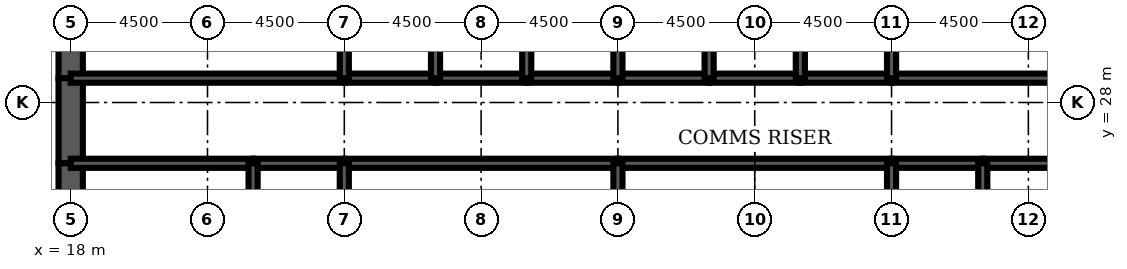
"""IFC4 building model, lengths in metres.
Left out: names, types, materials, properties, quantities, classifications, styles, units other than length and angle.
Written with IfcOpenShell. Run it as: python <this file> out.ifc"""

import sys

from ifc_helpers import new_model, si_unit, direction, frame, frame_2d, origin, place, context, subcontext, project, spatial, rectangle, extrude, element, fill, save


model = new_model("IFC4")
c1 = context("Model", 3, precision=1e-05, world=origin(), true_north=direction((0.0, 1.0)))
c2 = subcontext(c1, "Body", "Model", "MODEL_VIEW")
j1 = project(units=[si_unit("LENGTHUNIT", "METRE"), si_unit("PLANEANGLEUNIT", "RADIAN")], contexts=[c1])
p1 = place(None, origin())
s1 = spatial("IfcSite", under=j1, at=p1, CompositionType="ELEMENT")
p2 = place(p1, origin())
s2 = spatial("IfcBuilding", under=s1, at=p2, CompositionType="ELEMENT")
p3 = place(p2, frame((0.0, 0.0, 202.6)))
s3 = spatial("IfcBuildingStorey", under=s2, at=p3, CompositionType="ELEMENT", Elevation=202.6)
p4 = place(p3, frame((18.0, 32.0, 0.0), z_axis=(0.0, 0.0, 1.0), x_axis=(0.0, -1.0, 0.0)))
e1 = element("IfcWall", 1, at=p4, inside=s3, PredefinedType="SHEAR", context=c2, shape_type="SweptSolid", body=[
    extrude(rectangle(XDim=3.2, YDim=0.8, at=frame_2d((1.6, 0.0))), origin(), (0.0, 0.0, 1.0), 4.2),
])
p5 = place(p3, frame((18.0, 28.8, 0.0), z_axis=(0.0, 0.0, 1.0), x_axis=(0.0, -1.0, 0.0)))
e2 = element("IfcWall", 2, at=p5, inside=s3, PredefinedType="SHEAR", context=c2, shape_type="SweptSolid", body=[
    extrude(rectangle(XDim=2.8, YDim=0.8, at=frame_2d((1.4, 0.0))), origin(), (0.0, 0.0, 1.0), 4.2),
])
p6 = place(p5, frame((0.4, 0.0, 0.0)))
e3 = element("IfcOpeningElement", 3, at=p6, cuts=e2, PredefinedType="OPENING", context=c2, shape_type="SweptSolid", body=[
    extrude(rectangle(XDim=1.8, YDim=2.1, at=frame_2d((0.9, 1.05))), frame((0.0, 0.41, 0.0), z_axis=(0.0, -1.0, 0.0), x_axis=(1.0, 0.0, 0.0)), (0.0, 0.0, 1.0), 0.82),
])
p7 = place(p3, frame((18.0, 26.0, 0.0), z_axis=(0.0, 0.0, 1.0), x_axis=(0.0, -1.0, 0.0)))
e4 = element("IfcWall", 4, at=p7, inside=s3, PredefinedType="SHEAR", context=c2, shape_type="SweptSolid", body=[
    extrude(rectangle(XDim=4.0, YDim=0.8, at=frame_2d((2.0, 0.0))), origin(), (0.0, 0.0, 1.0), 4.2),
])
p8 = place(p3, frame((18.0, 28.8, 0.0), z_axis=(0.0, 0.0, 1.0), x_axis=(1.0, 0.0, 0.0)))
e5 = element("IfcWall", 5, at=p8, inside=s3, PredefinedType="SOLIDWALL", context=c2, shape_type="SweptSolid", body=[
    extrude(rectangle(XDim=9.0, YDim=0.3, at=frame_2d((4.5, 0.0))), origin(), (0.0, 0.0, 1.0), 4.2),
])
p9 = place(p8, frame((0.65, 0.0, 0.0)))
e6 = element("IfcOpeningElement", 6, at=p9, cuts=e5, PredefinedType="OPENING", context=c2, shape_type="SweptSolid", body=[
    extrude(rectangle(XDim=1.0, YDim=2.1, at=frame_2d((0.5, 1.05))), frame((0.0, 0.16, 0.0), z_axis=(0.0, -1.0, 0.0), x_axis=(1.0, 0.0, 0.0)), (0.0, 0.0, 1.0), 0.32),
])
p10 = place(p3, frame((27.0, 28.8, 0.0), z_axis=(0.0, 0.0, 1.0), x_axis=(1.0, 0.0, 0.0)))
e7 = element("IfcWall", 7, at=p10, inside=s3, PredefinedType="SOLIDWALL", context=c2, shape_type="SweptSolid", body=[
    extrude(rectangle(XDim=3.0, YDim=0.3, at=frame_2d((1.5, 0.0))), origin(), (0.0, 0.0, 1.0), 4.2),
])
p11 = place(p10, frame((0.95, 0.0, 0.0)))
e8 = element("IfcOpeningElement", 8, at=p11, cuts=e7, PredefinedType="OPENING", context=c2, shape_type="SweptSolid", body=[
    extrude(rectangle(XDim=1.1, YDim=2.2, at=frame_2d((0.55, 1.1))), frame((0.0, 0.16, 0.0), z_axis=(0.0, -1.0, 0.0), x_axis=(1.0, 0.0, 0.0)), (0.0, 0.0, 1.0), 0.32),
])
p12 = place(p3, frame((30.0, 28.8, 0.0), z_axis=(0.0, 0.0, 1.0), x_axis=(1.0, 0.0, 0.0)))
e9 = element("IfcWall", 9, at=p12, inside=s3, PredefinedType="SOLIDWALL", context=c2, shape_type="SweptSolid", body=[
    extrude(rectangle(XDim=3.0, YDim=0.3, at=frame_2d((1.5, 0.0))), origin(), (0.0, 0.0, 1.0), 4.2),
])
p13 = place(p12, frame((0.95, 0.0, 0.0)))
e10 = element("IfcOpeningElement", 10, at=p13, cuts=e9, PredefinedType="OPENING", context=c2, shape_type="SweptSolid", body=[
    extrude(rectangle(XDim=1.1, YDim=2.2, at=frame_2d((0.55, 1.1))), frame((0.0, 0.16, 0.0), z_axis=(0.0, -1.0, 0.0), x_axis=(1.0, 0.0, 0.0)), (0.0, 0.0, 1.0), 0.32),
])
p14 = place(p3, frame((33.0, 28.8, 0.0), z_axis=(0.0, 0.0, 1.0), x_axis=(1.0, 0.0, 0.0)))
e11 = element("IfcWall", 11, at=p14, inside=s3, PredefinedType="SOLIDWALL", context=c2, shape_type="SweptSolid", body=[
    extrude(rectangle(XDim=3.0, YDim=0.3, at=frame_2d((1.5, 0.0))), origin(), (0.0, 0.0, 1.0), 4.2),
])
p15 = place(p14, frame((0.95, 0.0, 0.0)))
e12 = element("IfcOpeningElement", 12, at=p15, cuts=e11, PredefinedType="OPENING", context=c2, shape_type="SweptSolid", body=[
    extrude(rectangle(XDim=1.1, YDim=2.2, at=frame_2d((0.55, 1.1))), frame((0.0, 0.16, 0.0), z_axis=(0.0, -1.0, 0.0), x_axis=(1.0, 0.0, 0.0)), (0.0, 0.0, 1.0), 0.32),
])
for number, where, z_axis, x_axis in (
    (13, (36.0, 28.8, 0.0), (0.0, 0.0, 1.0), (1.0, 0.0, 0.0)),
    (14, (39.0, 28.8, 0.0), (0.0, 0.0, 1.0), (1.0, 0.0, 0.0)),
):
    element("IfcWall", number, at=place(p3, frame(where, z_axis=z_axis, x_axis=x_axis)), inside=s3, PredefinedType="SOLIDWALL", context=c2, shape_type="SweptSolid", body=[
        extrude(rectangle(XDim=3.0, YDim=0.3, at=frame_2d((1.5, 0.0))), origin(), (0.0, 0.0, 1.0), 4.2),
    ])
p16 = place(p3, frame((42.0, 28.8, 0.0), z_axis=(0.0, 0.0, 1.0), x_axis=(1.0, 0.0, 0.0)))
e15 = element("IfcWall", 15, at=p16, inside=s3, PredefinedType="SOLIDWALL", context=c2, shape_type="SweptSolid", body=[
    extrude(rectangle(XDim=3.0, YDim=0.3, at=frame_2d((1.5, 0.0))), origin(), (0.0, 0.0, 1.0), 4.2),
])
p17 = place(p16, frame((0.95, 0.0, 0.0)))
e16 = element("IfcOpeningElement", 16, at=p17, cuts=e15, PredefinedType="OPENING", context=c2, shape_type="SweptSolid", body=[
    extrude(rectangle(XDim=1.1, YDim=2.2, at=frame_2d((0.55, 1.1))), frame((0.0, 0.16, 0.0), z_axis=(0.0, -1.0, 0.0), x_axis=(1.0, 0.0, 0.0)), (0.0, 0.0, 1.0), 0.32),
])
p18 = place(p3, frame((45.0, 28.8, 0.0), z_axis=(0.0, 0.0, 1.0), x_axis=(1.0, 0.0, 0.0)))
e17 = element("IfcWall", 17, at=p18, inside=s3, PredefinedType="SOLIDWALL", context=c2, shape_type="SweptSolid", body=[
    extrude(rectangle(XDim=9.0, YDim=0.3, at=frame_2d((4.5, 0.0))), origin(), (0.0, 0.0, 1.0), 4.2),
])
p19 = place(p18, frame((7.35, 0.0, 0.0)))
e18 = element("IfcOpeningElement", 18, at=p19, cuts=e17, PredefinedType="OPENING", context=c2, shape_type="SweptSolid", body=[
    extrude(rectangle(XDim=1.0, YDim=2.1, at=frame_2d((0.5, 1.05))), frame((0.0, 0.16, 0.0), z_axis=(0.0, -1.0, 0.0), x_axis=(1.0, 0.0, 0.0)), (0.0, 0.0, 1.0), 0.32),
])
p20 = place(p3, frame((18.0, 26.0, 0.0), z_axis=(0.0, 0.0, 1.0), x_axis=(1.0, 0.0, 0.0)))
e19 = element("IfcWall", 19, at=p20, inside=s3, PredefinedType="SOLIDWALL", context=c2, shape_type="SweptSolid", body=[
    extrude(rectangle(XDim=6.0, YDim=0.3, at=frame_2d((3.0, 0.0))), origin(), (0.0, 0.0, 1.0), 4.2),
])
p21 = place(p3, frame((24.0, 26.0, 0.0), z_axis=(0.0, 0.0, 1.0), x_axis=(1.0, 0.0, 0.0)))
e20 = element("IfcWall", 20, at=p21, inside=s3, PredefinedType="SOLIDWALL", context=c2, shape_type="SweptSolid", body=[
    extrude(rectangle(XDim=3.0, YDim=0.3, at=frame_2d((1.5, 0.0))), origin(), (0.0, 0.0, 1.0), 4.2),
])
for number, where, z_axis, x_axis in (
    (21, (27.0, 26.0, 0.0), (0.0, 0.0, 1.0), (1.0, 0.0, 0.0)),
    (22, (36.0, 26.0, 0.0), (0.0, 0.0, 1.0), (1.0, 0.0, 0.0)),
):
    element("IfcWall", number, at=place(p3, frame(where, z_axis=z_axis, x_axis=x_axis)), inside=s3, PredefinedType="SOLIDWALL", context=c2, shape_type="SweptSolid", body=[
        extrude(rectangle(XDim=9.0, YDim=0.3, at=frame_2d((4.5, 0.0))), origin(), (0.0, 0.0, 1.0), 4.2),
    ])
p22 = place(p3, frame((45.0, 26.0, 0.0), z_axis=(0.0, 0.0, 1.0), x_axis=(1.0, 0.0, 0.0)))
e23 = element("IfcWall", 23, at=p22, inside=s3, PredefinedType="SOLIDWALL", context=c2, shape_type="SweptSolid", body=[
    extrude(rectangle(XDim=3.0, YDim=0.3, at=frame_2d((1.5, 0.0))), origin(), (0.0, 0.0, 1.0), 4.2),
])
p23 = place(p3, frame((48.0, 26.0, 0.0), z_axis=(0.0, 0.0, 1.0), x_axis=(1.0, 0.0, 0.0)))
e24 = element("IfcWall", 24, at=p23, inside=s3, PredefinedType="SOLIDWALL", context=c2, shape_type="SweptSolid", body=[
    extrude(rectangle(XDim=6.0, YDim=0.3, at=frame_2d((3.0, 0.0))), origin(), (0.0, 0.0, 1.0), 4.2),
])
for number, where, z_axis, x_axis in (
    (25, (27.0, 28.8, 0.0), (0.0, 0.0, 1.0), (0.0, 1.0, 0.0)),
    (26, (30.0, 28.8, 0.0), (0.0, 0.0, 1.0), (0.0, 1.0, 0.0)),
    (27, (33.0, 28.8, 0.0), (0.0, 0.0, 1.0), (0.0, 1.0, 0.0)),
    (28, (36.0, 28.8, 0.0), (0.0, 0.0, 1.0), (0.0, 1.0, 0.0)),
    (29, (39.0, 28.8, 0.0), (0.0, 0.0, 1.0), (0.0, 1.0, 0.0)),
    (30, (42.0, 28.8, 0.0), (0.0, 0.0, 1.0), (0.0, 1.0, 0.0)),
    (31, (45.0, 28.8, 0.0), (0.0, 0.0, 1.0), (0.0, 1.0, 0.0)),
):
    element("IfcWall", number, at=place(p3, frame(where, z_axis=z_axis, x_axis=x_axis)), inside=s3, PredefinedType="SOLIDWALL", context=c2, shape_type="SweptSolid", body=[
        extrude(rectangle(XDim=3.2, YDim=0.3, at=frame_2d((1.6, 0.0))), origin(), (0.0, 0.0, 1.0), 4.2),
    ])
for number, where, z_axis, x_axis in (
    (32, (24.0, 22.0, 0.0), (0.0, 0.0, 1.0), (0.0, 1.0, 0.0)),
    (33, (27.0, 22.0, 0.0), (0.0, 0.0, 1.0), (0.0, 1.0, 0.0)),
    (34, (36.0, 22.0, 0.0), (0.0, 0.0, 1.0), (0.0, 1.0, 0.0)),
    (35, (45.0, 22.0, 0.0), (0.0, 0.0, 1.0), (0.0, 1.0, 0.0)),
    (36, (48.0, 22.0, 0.0), (0.0, 0.0, 1.0), (0.0, 1.0, 0.0)),
):
    element("IfcWall", number, at=place(p3, frame(where, z_axis=z_axis, x_axis=x_axis)), inside=s3, PredefinedType="SOLIDWALL", context=c2, shape_type="SweptSolid", body=[
        extrude(rectangle(XDim=4.0, YDim=0.3, at=frame_2d((2.0, 0.0))), origin(), (0.0, 0.0, 1.0), 4.2),
    ])
p24 = place(p3, frame((42.5, 22.15, 0.0), z_axis=(0.0, 0.0, 1.0), x_axis=(0.0, 1.0, 0.0)))
e37 = element("IfcWall", 37, at=p24, inside=s3, PredefinedType="PARTITIONING", context=c2, shape_type="SweptSolid", body=[
    extrude(rectangle(XDim=3.7, YDim=0.15, at=frame_2d((1.85, 0.0))), origin(), (0.0, 0.0, 1.0), 3.0),
])
p25 = place(p24, frame((2.2, 0.0, 0.0)))
e38 = element("IfcOpeningElement", 38, at=p25, cuts=e37, PredefinedType="OPENING", context=c2, shape_type="SweptSolid", body=[
    extrude(rectangle(XDim=1.0, YDim=2.1, at=frame_2d((0.5, 1.05))), frame((0.0, 0.085, 0.0), z_axis=(0.0, -1.0, 0.0), x_axis=(1.0, 0.0, 0.0)), (0.0, 0.0, 1.0), 0.17),
])
p26 = place(p3, frame((19.975, 22.15, 0.0), z_axis=(0.0, 0.0, 1.0), x_axis=(0.0, 1.0, 0.0)))
e39 = element("IfcWall", 39, at=p26, inside=s3, PredefinedType="PARTITIONING", context=c2, shape_type="SweptSolid", body=[
    extrude(rectangle(XDim=3.7, YDim=0.15, at=frame_2d((1.85, 0.0))), origin(), (0.0, 0.0, 1.0), 3.0),
])
p27 = place(p3, frame((49.2, 26.15, 0.0), z_axis=(0.0, 0.0, 1.0), x_axis=(0.0, 1.0, 0.0)))
e40 = element("IfcWall", 40, at=p27, inside=s3, PredefinedType="PARTITIONING", context=c2, shape_type="SweptSolid", body=[
    extrude(rectangle(XDim=2.5, YDim=0.15, at=frame_2d((1.25, 0.0))), origin(), (0.0, 0.0, 1.0), 3.0),
])
p28 = place(p27, frame((1.15, 0.0, 0.0)))
e41 = element("IfcOpeningElement", 41, at=p28, cuts=e40, PredefinedType="OPENING", context=c2, shape_type="SweptSolid", body=[
    extrude(rectangle(XDim=1.0, YDim=2.1, at=frame_2d((0.5, 1.05))), frame((0.0, 0.085, 0.0), z_axis=(0.0, -1.0, 0.0), x_axis=(1.0, 0.0, 0.0)), (0.0, 0.0, 1.0), 0.17),
])
p29 = place(p25, origin())
e42 = element("IfcDoor", 42, at=p29, inside=s3, OperationType="SINGLE_SWING_RIGHT", PredefinedType="DOOR", context=c2, shape_type="SweptSolid", body=[
    extrude(rectangle(XDim=1.0, YDim=2.1, at=frame_2d((0.5, 1.05))), frame((0.0, 0.025, 0.0), z_axis=(0.0, -1.0, 0.0), x_axis=(1.0, 0.0, 0.0)), (0.0, 0.0, 1.0), 0.05),
])
fill(e38, e42)
p30 = place(p28, origin())
e43 = element("IfcDoor", 43, at=p30, inside=s3, OperationType="SINGLE_SWING_RIGHT", PredefinedType="DOOR", context=c2, shape_type="SweptSolid", body=[
    extrude(rectangle(XDim=1.0, YDim=2.1, at=frame_2d((0.5, 1.05))), frame((0.0, 0.025, 0.0), z_axis=(0.0, -1.0, 0.0), x_axis=(1.0, 0.0, 0.0)), (0.0, 0.0, 1.0), 0.05),
])
fill(e41, e43)
p31 = place(p17, origin())
e44 = element("IfcDoor", 44, at=p31, inside=s3, OperationType="DOUBLE_DOOR_SLIDING", PredefinedType="USERDEFINED", context=c2, shape_type="SweptSolid", body=[
    extrude(rectangle(XDim=1.1, YDim=2.2, at=frame_2d((0.55, 1.1))), frame((0.0, 0.025, 0.0), z_axis=(0.0, -1.0, 0.0), x_axis=(1.0, 0.0, 0.0)), (0.0, 0.0, 1.0), 0.05),
])
fill(e16, e44)
p32 = place(p11, origin())
e45 = element("IfcDoor", 45, at=p32, inside=s3, OperationType="DOUBLE_DOOR_SLIDING", PredefinedType="USERDEFINED", context=c2, shape_type="SweptSolid", body=[
    extrude(rectangle(XDim=1.1, YDim=2.2, at=frame_2d((0.55, 1.1))), frame((0.0, 0.025, 0.0), z_axis=(0.0, -1.0, 0.0), x_axis=(1.0, 0.0, 0.0)), (0.0, 0.0, 1.0), 0.05),
])
fill(e8, e45)
p33 = place(p13, origin())
e46 = element("IfcDoor", 46, at=p33, inside=s3, OperationType="DOUBLE_DOOR_SLIDING", PredefinedType="USERDEFINED", context=c2, shape_type="SweptSolid", body=[
    extrude(rectangle(XDim=1.1, YDim=2.2, at=frame_2d((0.55, 1.1))), frame((0.0, 0.025, 0.0), z_axis=(0.0, -1.0, 0.0), x_axis=(1.0, 0.0, 0.0)), (0.0, 0.0, 1.0), 0.05),
])
fill(e10, e46)
p34 = place(p15, origin())
e47 = element("IfcDoor", 47, at=p34, inside=s3, OperationType="DOUBLE_DOOR_SLIDING", PredefinedType="USERDEFINED", context=c2, shape_type="SweptSolid", body=[
    extrude(rectangle(XDim=1.1, YDim=2.2, at=frame_2d((0.55, 1.1))), frame((0.0, 0.025, 0.0), z_axis=(0.0, -1.0, 0.0), x_axis=(1.0, 0.0, 0.0)), (0.0, 0.0, 1.0), 0.05),
])
fill(e12, e47)
p35 = place(p9, origin())
e48 = element("IfcDoor", 48, at=p35, inside=s3, OperationType="SINGLE_SWING_LEFT", PredefinedType="DOOR", context=c2, shape_type="SweptSolid", body=[
    extrude(rectangle(XDim=1.0, YDim=2.1, at=frame_2d((0.5, 1.05))), frame((0.0, 0.025, 0.0), z_axis=(0.0, -1.0, 0.0), x_axis=(1.0, 0.0, 0.0)), (0.0, 0.0, 1.0), 0.05),
])
fill(e6, e48)
p36 = place(p6, origin())
e49 = element("IfcDoor", 49, at=p36, inside=s3, OperationType="SINGLE_SWING_LEFT", PredefinedType="DOOR", context=c2, shape_type="SweptSolid", body=[
    extrude(rectangle(XDim=1.8, YDim=2.1, at=frame_2d((0.9, 1.05))), frame((0.0, 0.4, 0.0), z_axis=(0.0, -1.0, 0.0), x_axis=(1.0, 0.0, 0.0)), (0.0, 0.0, 1.0), 0.8),
])
fill(e3, e49)
save(model, sys.argv[1])
